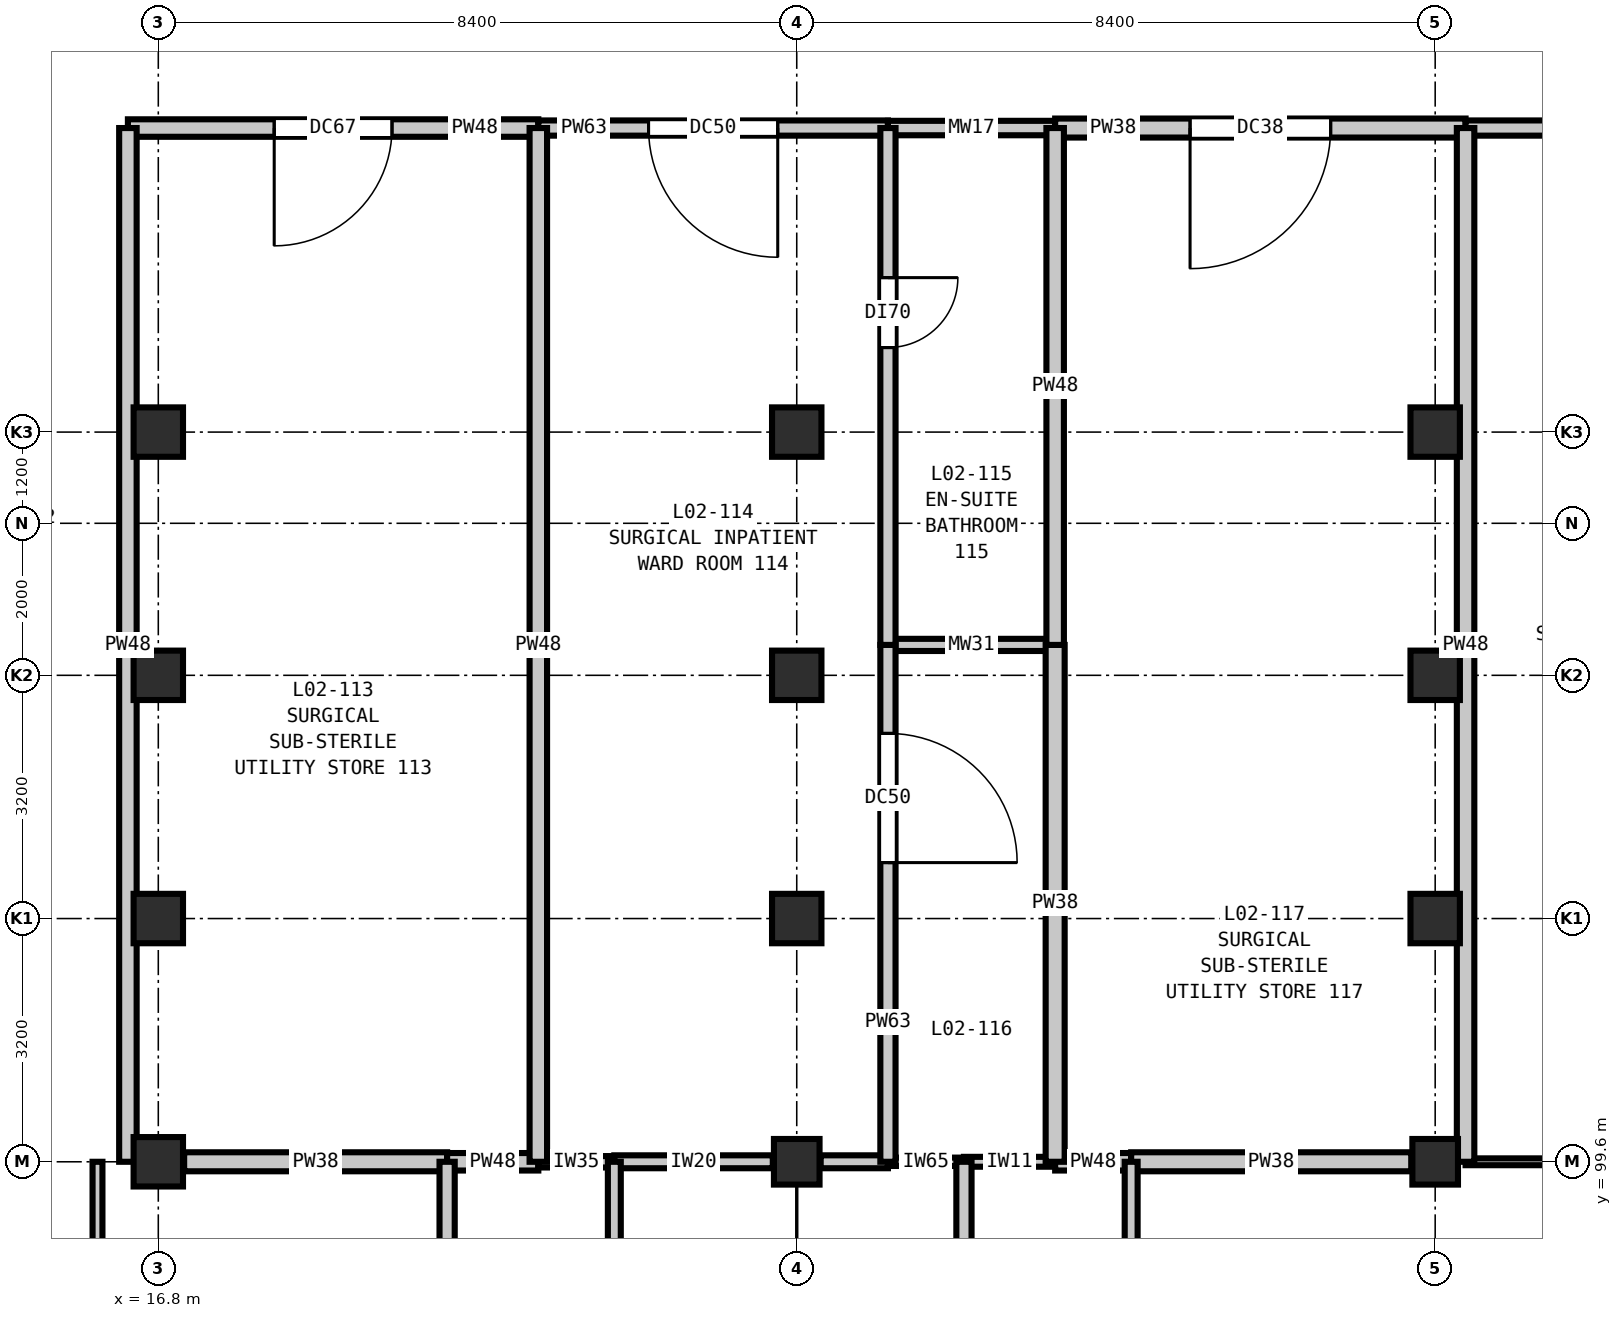
"""IFC4 building model, lengths in metres.
Left out: names, types, materials, properties, quantities, classifications, styles, units other than length and angle.
Written with IfcOpenShell. Run it as: python <this file> out.ifc"""

import sys

from ifc_helpers import new_model, si_unit, direction, frame, frame_2d, origin, origin_2d, place, context, subcontext, project, spatial, rectangle, extrude, element, fill, save


model = new_model("IFC4")
c1 = context("Model", 3, precision=1e-05, world=origin(), true_north=direction((0.0, 1.0)))
c2 = subcontext(c1, "Body", "Model", "MODEL_VIEW")
j1 = project(units=[si_unit("LENGTHUNIT", "METRE"), si_unit("PLANEANGLEUNIT", "RADIAN")], contexts=[c1])
p1 = place(None, origin())
s1 = spatial("IfcSite", under=j1, at=p1, CompositionType="ELEMENT")
p2 = place(p1, origin())
s2 = spatial("IfcBuilding", under=s1, at=p2, CompositionType="ELEMENT")
p3 = place(p2, frame((0.0, 0.0, 10.8)))
s3 = spatial("IfcBuildingStorey", under=s2, at=p3, CompositionType="ELEMENT", Elevation=10.8)
for number, where, z_axis, x_axis in (
    (1, (16.8, 99.6, 0.0), (0.0, 0.0, 1.0), (1.0, 0.0, 0.0)),
    (2, (16.8, 102.8, 0.0), (0.0, 0.0, 1.0), (1.0, 0.0, 0.0)),
    (3, (16.8, 106.0, 0.0), (0.0, 0.0, 1.0), (1.0, 0.0, 0.0)),
    (4, (16.8, 109.2, 0.0), (0.0, 0.0, 1.0), (1.0, 0.0, 0.0)),
):
    element("IfcColumn", number, at=place(p3, frame(where, z_axis=z_axis, x_axis=x_axis)), inside=s3, PredefinedType="COLUMN", context=c2, shape_type="SweptSolid", body=[
        extrude(rectangle(XDim=0.65, YDim=0.65, at=origin_2d()), origin(), (0.0, 0.0, 1.0), 5.4),
    ])
p4 = place(p3, frame((25.2, 99.6, 0.0), z_axis=(0.0, 0.0, 1.0), x_axis=(1.0, 0.0, 0.0)))
e5 = element("IfcColumn", 5, at=p4, inside=s3, PredefinedType="COLUMN", context=c2, shape_type="SweptSolid", body=[
    extrude(rectangle(XDim=0.6, YDim=0.6, at=origin_2d()), origin(), (0.0, 0.0, 1.0), 5.4),
])
for number, where, z_axis, x_axis in (
    (6, (25.2, 102.8, 0.0), (0.0, 0.0, 1.0), (1.0, 0.0, 0.0)),
    (7, (25.2, 106.0, 0.0), (0.0, 0.0, 1.0), (1.0, 0.0, 0.0)),
    (8, (25.2, 109.2, 0.0), (0.0, 0.0, 1.0), (1.0, 0.0, 0.0)),
):
    element("IfcColumn", number, at=place(p3, frame(where, z_axis=z_axis, x_axis=x_axis)), inside=s3, PredefinedType="COLUMN", context=c2, shape_type="SweptSolid", body=[
        extrude(rectangle(XDim=0.65, YDim=0.65, at=origin_2d()), origin(), (0.0, 0.0, 1.0), 5.4),
    ])
p5 = place(p3, frame((33.6, 99.6, 0.0), z_axis=(0.0, 0.0, 1.0), x_axis=(1.0, 0.0, 0.0)))
e9 = element("IfcColumn", 9, at=p5, inside=s3, PredefinedType="COLUMN", context=c2, shape_type="SweptSolid", body=[
    extrude(rectangle(XDim=0.6, YDim=0.6, at=origin_2d()), origin(), (0.0, 0.0, 1.0), 5.4),
])
for number, where, z_axis, x_axis in (
    (10, (33.6, 102.8, 0.0), (0.0, 0.0, 1.0), (1.0, 0.0, 0.0)),
    (11, (33.6, 106.0, 0.0), (0.0, 0.0, 1.0), (1.0, 0.0, 0.0)),
    (12, (33.6, 109.2, 0.0), (0.0, 0.0, 1.0), (1.0, 0.0, 0.0)),
):
    element("IfcColumn", number, at=place(p3, frame(where, z_axis=z_axis, x_axis=x_axis)), inside=s3, PredefinedType="COLUMN", context=c2, shape_type="SweptSolid", body=[
        extrude(rectangle(XDim=0.65, YDim=0.65, at=origin_2d()), origin(), (0.0, 0.0, 1.0), 5.4),
    ])
p6 = place(p3, frame((17.14, 99.6, 0.0), z_axis=(0.0, 0.0, 1.0), x_axis=(1.0, 0.0, 0.0)))
e13 = element("IfcWall", 13, at=p6, inside=s3, PredefinedType="PARTITIONING", context=c2, shape_type="SweptSolid", body=[
    extrude(rectangle(XDim=3.46, YDim=0.25, at=frame_2d((1.73, 0.0))), origin(), (0.0, 0.0, 1.0), 4.735),
])
p7 = place(p3, frame((20.6, 99.6, 0.0), z_axis=(0.0, 0.0, 1.0), x_axis=(1.0, 0.0, 0.0)))
e14 = element("IfcWall", 14, at=p7, inside=s3, PredefinedType="PARTITIONING", context=c2, shape_type="SweptSolid", body=[
    extrude(rectangle(XDim=1.2, YDim=0.23, at=frame_2d((0.6, 0.0))), origin(), (0.0, 0.0, 1.0), 4.735),
])
p8 = place(p3, frame((21.8, 99.6, 0.0), z_axis=(0.0, 0.0, 1.0), x_axis=(1.0, 0.0, 0.0)))
e15 = element("IfcWall", 15, at=p8, inside=s3, PredefinedType="PARTITIONING", context=c2, shape_type="SweptSolid", body=[
    extrude(rectangle(XDim=1.0, YDim=0.15, at=frame_2d((0.5, 0.0))), origin(), (0.0, 0.0, 1.0), 4.735),
])
p9 = place(p3, frame((22.8, 99.6, 0.0), z_axis=(0.0, 0.0, 1.0), x_axis=(1.0, 0.0, 0.0)))
e16 = element("IfcWall", 16, at=p9, inside=s3, PredefinedType="PARTITIONING", context=c2, shape_type="SweptSolid", body=[
    extrude(rectangle(XDim=2.085, YDim=0.17, at=frame_2d((1.042, 0.0))), origin(), (0.0, 0.0, 1.0), 4.735),
])
p10 = place(p3, frame((25.515, 99.6, 0.0), z_axis=(0.0, 0.0, 1.0), x_axis=(1.0, 0.0, 0.0)))
e17 = element("IfcWall", 17, at=p10, inside=s3, PredefinedType="PARTITIONING", context=c2, shape_type="SweptSolid", body=[
    extrude(rectangle(XDim=0.885, YDim=0.17, at=frame_2d((0.442, 0.0))), origin(), (0.0, 0.0, 1.0), 4.735),
])
p11 = place(p3, frame((26.4, 99.6, 0.0), z_axis=(0.0, 0.0, 1.0), x_axis=(1.0, 0.0, 0.0)))
e18 = element("IfcWall", 18, at=p11, inside=s3, PredefinedType="PARTITIONING", context=c2, shape_type="SweptSolid", body=[
    extrude(rectangle(XDim=1.0, YDim=0.11, at=frame_2d((0.5, 0.0))), origin(), (0.0, 0.0, 1.0), 4.735),
])
p12 = place(p3, frame((27.4, 99.6, 0.0), z_axis=(0.0, 0.0, 1.0), x_axis=(1.0, 0.0, 0.0)))
e19 = element("IfcWall", 19, at=p12, inside=s3, PredefinedType="PARTITIONING", context=c2, shape_type="SweptSolid", body=[
    extrude(rectangle(XDim=1.2, YDim=0.13, at=frame_2d((0.6, 0.0))), origin(), (0.0, 0.0, 1.0), 4.735),
])
p13 = place(p3, frame((28.6, 99.6, 0.0), z_axis=(0.0, 0.0, 1.0), x_axis=(1.0, 0.0, 0.0)))
e20 = element("IfcWall", 20, at=p13, inside=s3, PredefinedType="PARTITIONING", context=c2, shape_type="SweptSolid", body=[
    extrude(rectangle(XDim=1.0, YDim=0.23, at=frame_2d((0.5, 0.0))), origin(), (0.0, 0.0, 1.0), 4.735),
])
p14 = place(p3, frame((29.6, 99.6, 0.0), z_axis=(0.0, 0.0, 1.0), x_axis=(1.0, 0.0, 0.0)))
e21 = element("IfcWall", 21, at=p14, inside=s3, PredefinedType="PARTITIONING", context=c2, shape_type="SweptSolid", body=[
    extrude(rectangle(XDim=3.685, YDim=0.25, at=frame_2d((1.842, 0.0))), origin(), (0.0, 0.0, 1.0), 4.735),
])
p15 = place(p3, frame((34.0, 99.6, 0.0), z_axis=(0.0, 0.0, 1.0), x_axis=(1.0, 0.0, 0.0)))
e22 = element("IfcWall", 22, at=p15, inside=s3, PredefinedType="PARTITIONING", context=c2, shape_type="SweptSolid", body=[
    extrude(rectangle(XDim=4.6, YDim=0.09, at=frame_2d((2.3, 0.0))), origin(), (0.0, 0.0, 1.0), 4.735),
])
p16 = place(p3, frame((26.4, 106.4, 0.0), z_axis=(0.0, 0.0, 1.0), x_axis=(1.0, 0.0, 0.0)))
e23 = element("IfcWall", 23, at=p16, inside=s3, PredefinedType="PLUMBINGWALL", context=c2, shape_type="SweptSolid", body=[
    extrude(rectangle(XDim=2.2, YDim=0.16, at=frame_2d((1.1, 0.0))), origin(), (0.0, 0.0, 1.0), 5.07),
])
p17 = place(p3, frame((16.4, 113.2, 0.0), z_axis=(0.0, 0.0, 1.0), x_axis=(1.0, 0.0, 0.0)))
e24 = element("IfcWall", 24, at=p17, inside=s3, PredefinedType="PARTITIONING", context=c2, shape_type="SweptSolid", body=[
    extrude(rectangle(XDim=5.4, YDim=0.23, at=frame_2d((2.7, 0.0))), origin(), (0.0, 0.0, 1.0), 5.07),
])
p18 = place(p17, frame((1.925, 0.0, 0.0)))
e25 = element("IfcOpeningElement", 25, at=p18, cuts=e24, PredefinedType="OPENING", context=c2, shape_type="SweptSolid", body=[
    extrude(rectangle(XDim=1.55, YDim=2.25, at=frame_2d((0.775, 1.125))), frame((0.0, 0.125, 0.0), z_axis=(0.0, -1.0, 0.0), x_axis=(1.0, 0.0, 0.0)), (0.0, 0.0, 1.0), 0.25),
])
p19 = place(p3, frame((21.8, 113.2, 0.0), z_axis=(0.0, 0.0, 1.0), x_axis=(1.0, 0.0, 0.0)))
e26 = element("IfcWall", 26, at=p19, inside=s3, PredefinedType="PARTITIONING", context=c2, shape_type="SweptSolid", body=[
    extrude(rectangle(XDim=4.6, YDim=0.2, at=frame_2d((2.3, 0.0))), origin(), (0.0, 0.0, 1.0), 5.07),
])
p20 = place(p19, frame((1.45, 0.0, 0.0)))
e27 = element("IfcOpeningElement", 27, at=p20, cuts=e26, PredefinedType="OPENING", context=c2, shape_type="SweptSolid", body=[
    extrude(rectangle(XDim=1.7, YDim=2.3, at=frame_2d((0.85, 1.15))), frame((0.0, 0.11, 0.0), z_axis=(0.0, -1.0, 0.0), x_axis=(1.0, 0.0, 0.0)), (0.0, 0.0, 1.0), 0.22),
])
p21 = place(p3, frame((26.4, 113.2, 0.0), z_axis=(0.0, 0.0, 1.0), x_axis=(1.0, 0.0, 0.0)))
e28 = element("IfcWall", 28, at=p21, inside=s3, PredefinedType="PLUMBINGWALL", context=c2, shape_type="SweptSolid", body=[
    extrude(rectangle(XDim=2.2, YDim=0.19, at=frame_2d((1.1, 0.0))), origin(), (0.0, 0.0, 1.0), 5.07),
])
p22 = place(p3, frame((28.6, 113.2, 0.0), z_axis=(0.0, 0.0, 1.0), x_axis=(1.0, 0.0, 0.0)))
e29 = element("IfcWall", 29, at=p22, inside=s3, PredefinedType="PARTITIONING", context=c2, shape_type="SweptSolid", body=[
    extrude(rectangle(XDim=5.4, YDim=0.25, at=frame_2d((2.7, 0.0))), origin(), (0.0, 0.0, 1.0), 5.07),
])
p23 = place(p22, frame((1.775, 0.0, 0.0)))
e30 = element("IfcOpeningElement", 30, at=p23, cuts=e29, PredefinedType="OPENING", context=c2, shape_type="SweptSolid", body=[
    extrude(rectangle(XDim=1.85, YDim=2.3, at=frame_2d((0.925, 1.15))), frame((0.0, 0.135, 0.0), z_axis=(0.0, -1.0, 0.0), x_axis=(1.0, 0.0, 0.0)), (0.0, 0.0, 1.0), 0.27),
])
p24 = place(p3, frame((34.0, 113.2, 0.0), z_axis=(0.0, 0.0, 1.0), x_axis=(1.0, 0.0, 0.0)))
e31 = element("IfcWall", 31, at=p24, inside=s3, PredefinedType="PARTITIONING", context=c2, shape_type="SweptSolid", body=[
    extrude(rectangle(XDim=4.6, YDim=0.2, at=frame_2d((2.3, 0.0))), origin(), (0.0, 0.0, 1.0), 5.07),
])
p25 = place(p24, frame((1.675, 0.0, 0.0)))
e32 = element("IfcOpeningElement", 32, at=p25, cuts=e31, PredefinedType="OPENING", context=c2, shape_type="SweptSolid", body=[
    extrude(rectangle(XDim=1.25, YDim=2.15, at=frame_2d((0.625, 1.075))), frame((0.0, 0.11, 0.0), z_axis=(0.0, -1.0, 0.0), x_axis=(1.0, 0.0, 0.0)), (0.0, 0.0, 1.0), 0.22),
])
p26 = place(p3, frame((16.0, 88.6, 0.0), z_axis=(0.0, 0.0, 1.0), x_axis=(0.0, 1.0, 0.0)))
e33 = element("IfcWall", 33, at=p26, inside=s3, PredefinedType="PARTITIONING", context=c2, shape_type="SweptSolid", body=[
    extrude(rectangle(XDim=11.0, YDim=0.13, at=frame_2d((5.5, 0.0))), origin(), (0.0, 0.0, 1.0), 5.07),
])
p27 = place(p3, frame((16.4, 99.6, 0.0), z_axis=(0.0, 0.0, 1.0), x_axis=(0.0, 1.0, 0.0)))
e34 = element("IfcWall", 34, at=p27, inside=s3, PredefinedType="PARTITIONING", context=c2, shape_type="SweptSolid", body=[
    extrude(rectangle(XDim=13.6, YDim=0.23, at=frame_2d((6.8, 0.0))), origin(), (0.0, 0.0, 1.0), 5.07),
])
p28 = place(p3, frame((20.6, 94.1, 0.0), z_axis=(0.0, 0.0, 1.0), x_axis=(0.0, 1.0, 0.0)))
e35 = element("IfcWall", 35, at=p28, inside=s3, PredefinedType="PARTITIONING", context=c2, shape_type="SweptSolid", body=[
    extrude(rectangle(XDim=5.5, YDim=0.2, at=frame_2d((2.75, 0.0))), origin(), (0.0, 0.0, 1.0), 5.07),
])
p29 = place(p28, frame((1.975, 0.0, 0.0)))
e36 = element("IfcOpeningElement", 36, at=p29, cuts=e35, PredefinedType="OPENING", context=c2, shape_type="SweptSolid", body=[
    extrude(rectangle(XDim=1.55, YDim=2.25, at=frame_2d((0.775, 1.125))), frame((0.0, 0.11, 0.0), z_axis=(0.0, -1.0, 0.0), x_axis=(1.0, 0.0, 0.0)), (0.0, 0.0, 1.0), 0.22),
])
p30 = place(p3, frame((21.8, 99.6, 0.0), z_axis=(0.0, 0.0, 1.0), x_axis=(0.0, 1.0, 0.0)))
e37 = element("IfcWall", 37, at=p30, inside=s3, PredefinedType="PARTITIONING", context=c2, shape_type="SweptSolid", body=[
    extrude(rectangle(XDim=13.6, YDim=0.23, at=frame_2d((6.8, 0.0))), origin(), (0.0, 0.0, 1.0), 5.07),
])
p31 = place(p3, frame((22.8, 94.1, 0.0), z_axis=(0.0, 0.0, 1.0), x_axis=(0.0, 1.0, 0.0)))
e38 = element("IfcWall", 38, at=p31, inside=s3, PredefinedType="PARTITIONING", context=c2, shape_type="SweptSolid", body=[
    extrude(rectangle(XDim=5.5, YDim=0.17, at=frame_2d((2.75, 0.0))), origin(), (0.0, 0.0, 1.0), 5.07),
])
p32 = place(p3, frame((26.4, 99.6, 0.0), z_axis=(0.0, 0.0, 1.0), x_axis=(0.0, 1.0, 0.0)))
e39 = element("IfcWall", 39, at=p32, inside=s3, PredefinedType="PARTITIONING", context=c2, shape_type="SweptSolid", body=[
    extrude(rectangle(XDim=6.8, YDim=0.2, at=frame_2d((3.4, 0.0))), origin(), (0.0, 0.0, 1.0), 5.07),
])
p33 = place(p32, frame((3.936, 0.0, 0.0)))
e40 = element("IfcOpeningElement", 40, at=p33, cuts=e39, PredefinedType="OPENING", context=c2, shape_type="SweptSolid", body=[
    extrude(rectangle(XDim=1.7, YDim=2.3, at=frame_2d((0.85, 1.15))), frame((0.0, 0.11, 0.0), z_axis=(0.0, -1.0, 0.0), x_axis=(1.0, 0.0, 0.0)), (0.0, 0.0, 1.0), 0.22),
])
p34 = place(p3, frame((26.4, 106.4, 0.0), z_axis=(0.0, 0.0, 1.0), x_axis=(0.0, 1.0, 0.0)))
e41 = element("IfcWall", 41, at=p34, inside=s3, PredefinedType="PARTITIONING", context=c2, shape_type="SweptSolid", body=[
    extrude(rectangle(XDim=6.8, YDim=0.2, at=frame_2d((3.4, 0.0))), origin(), (0.0, 0.0, 1.0), 5.07),
])
p35 = place(p34, frame((3.912, 0.0, 0.0)))
e42 = element("IfcOpeningElement", 42, at=p35, cuts=e41, PredefinedType="OPENING", context=c2, shape_type="SweptSolid", body=[
    extrude(rectangle(XDim=0.92, YDim=2.1, at=frame_2d((0.46, 1.05))), frame((0.0, 0.11, 0.0), z_axis=(0.0, -1.0, 0.0), x_axis=(1.0, 0.0, 0.0)), (0.0, 0.0, 1.0), 0.22),
])
p36 = place(p3, frame((27.4, 94.1, 0.0), z_axis=(0.0, 0.0, 1.0), x_axis=(0.0, 1.0, 0.0)))
e43 = element("IfcWall", 43, at=p36, inside=s3, PredefinedType="PARTITIONING", context=c2, shape_type="SweptSolid", body=[
    extrude(rectangle(XDim=5.5, YDim=0.2, at=frame_2d((2.75, 0.0))), origin(), (0.0, 0.0, 1.0), 5.07),
])
p37 = place(p36, frame((2.1, 0.0, 0.0)))
e44 = element("IfcOpeningElement", 44, at=p37, cuts=e43, PredefinedType="OPENING", context=c2, shape_type="SweptSolid", body=[
    extrude(rectangle(XDim=1.3, YDim=2.2, at=frame_2d((0.65, 1.1))), frame((0.0, 0.11, 0.0), z_axis=(0.0, -1.0, 0.0), x_axis=(1.0, 0.0, 0.0)), (0.0, 0.0, 1.0), 0.22),
])
p38 = place(p3, frame((28.6, 99.6, 0.0), z_axis=(0.0, 0.0, 1.0), x_axis=(0.0, 1.0, 0.0)))
e45 = element("IfcWall", 45, at=p38, inside=s3, PredefinedType="PARTITIONING", context=c2, shape_type="SweptSolid", body=[
    extrude(rectangle(XDim=6.8, YDim=0.25, at=frame_2d((3.4, 0.0))), origin(), (0.0, 0.0, 1.0), 5.07),
])
p39 = place(p3, frame((28.6, 106.4, 0.0), z_axis=(0.0, 0.0, 1.0), x_axis=(0.0, 1.0, 0.0)))
e46 = element("IfcWall", 46, at=p39, inside=s3, PredefinedType="PARTITIONING", context=c2, shape_type="SweptSolid", body=[
    extrude(rectangle(XDim=6.8, YDim=0.23, at=frame_2d((3.4, 0.0))), origin(), (0.0, 0.0, 1.0), 5.07),
])
p40 = place(p3, frame((29.6, 94.1, 0.0), z_axis=(0.0, 0.0, 1.0), x_axis=(0.0, 1.0, 0.0)))
e47 = element("IfcWall", 47, at=p40, inside=s3, PredefinedType="PARTITIONING", context=c2, shape_type="SweptSolid", body=[
    extrude(rectangle(XDim=5.5, YDim=0.17, at=frame_2d((2.75, 0.0))), origin(), (0.0, 0.0, 1.0), 5.07),
])
p41 = place(p3, frame((34.0, 99.6, 0.0), z_axis=(0.0, 0.0, 1.0), x_axis=(0.0, 1.0, 0.0)))
e48 = element("IfcWall", 48, at=p41, inside=s3, PredefinedType="PARTITIONING", context=c2, shape_type="SweptSolid", body=[
    extrude(rectangle(XDim=13.6, YDim=0.23, at=frame_2d((6.8, 0.0))), origin(), (0.0, 0.0, 1.0), 5.07),
])
p42 = place(p18, frame((1.55, 0.0, 0.0), z_axis=(0.0, 0.0, 1.0), x_axis=(-1.0, 0.0, 0.0)))
e49 = element("IfcDoor", 49, at=p42, inside=s3, OperationType="SINGLE_SWING_RIGHT", PredefinedType="DOOR", context=c2, shape_type="SweptSolid", body=[
    extrude(rectangle(XDim=1.55, YDim=2.25, at=frame_2d((0.775, 1.125))), frame((0.0, 0.025, 0.0), z_axis=(0.0, -1.0, 0.0), x_axis=(1.0, 0.0, 0.0)), (0.0, 0.0, 1.0), 0.05),
])
fill(e25, e49)
p43 = place(p20, frame((1.7, 0.0, 0.0), z_axis=(0.0, 0.0, 1.0), x_axis=(-1.0, 0.0, 0.0)))
e50 = element("IfcDoor", 50, at=p43, inside=s3, OperationType="SINGLE_SWING_LEFT", PredefinedType="DOOR", context=c2, shape_type="SweptSolid", body=[
    extrude(rectangle(XDim=1.7, YDim=2.3, at=frame_2d((0.85, 1.15))), frame((0.0, 0.025, 0.0), z_axis=(0.0, -1.0, 0.0), x_axis=(1.0, 0.0, 0.0)), (0.0, 0.0, 1.0), 0.05),
])
fill(e27, e50)
p44 = place(p23, frame((1.85, 0.0, 0.0), z_axis=(0.0, 0.0, 1.0), x_axis=(-1.0, 0.0, 0.0)))
e51 = element("IfcDoor", 51, at=p44, inside=s3, OperationType="SINGLE_SWING_RIGHT", PredefinedType="DOOR", context=c2, shape_type="SweptSolid", body=[
    extrude(rectangle(XDim=1.85, YDim=2.3, at=frame_2d((0.925, 1.15))), frame((0.0, 0.025, 0.0), z_axis=(0.0, -1.0, 0.0), x_axis=(1.0, 0.0, 0.0)), (0.0, 0.0, 1.0), 0.05),
])
fill(e30, e51)
p45 = place(p33, frame((1.7, 0.0, 0.0), z_axis=(0.0, 0.0, 1.0), x_axis=(-1.0, 0.0, 0.0)))
e52 = element("IfcDoor", 52, at=p45, inside=s3, OperationType="SINGLE_SWING_RIGHT", PredefinedType="DOOR", context=c2, shape_type="SweptSolid", body=[
    extrude(rectangle(XDim=1.7, YDim=2.3, at=frame_2d((0.85, 1.15))), frame((0.0, 0.025, 0.0), z_axis=(0.0, -1.0, 0.0), x_axis=(1.0, 0.0, 0.0)), (0.0, 0.0, 1.0), 0.05),
])
fill(e40, e52)
p46 = place(p35, frame((0.92, 0.0, 0.0), z_axis=(0.0, 0.0, 1.0), x_axis=(-1.0, 0.0, 0.0)))
e53 = element("IfcDoor", 53, at=p46, inside=s3, OperationType="SINGLE_SWING_LEFT", PredefinedType="DOOR", context=c2, shape_type="SweptSolid", body=[
    extrude(rectangle(XDim=0.92, YDim=2.1, at=frame_2d((0.46, 1.05))), frame((0.0, 0.025, 0.0), z_axis=(0.0, -1.0, 0.0), x_axis=(1.0, 0.0, 0.0)), (0.0, 0.0, 1.0), 0.05),
])
fill(e42, e53)
save(model, sys.argv[1])
